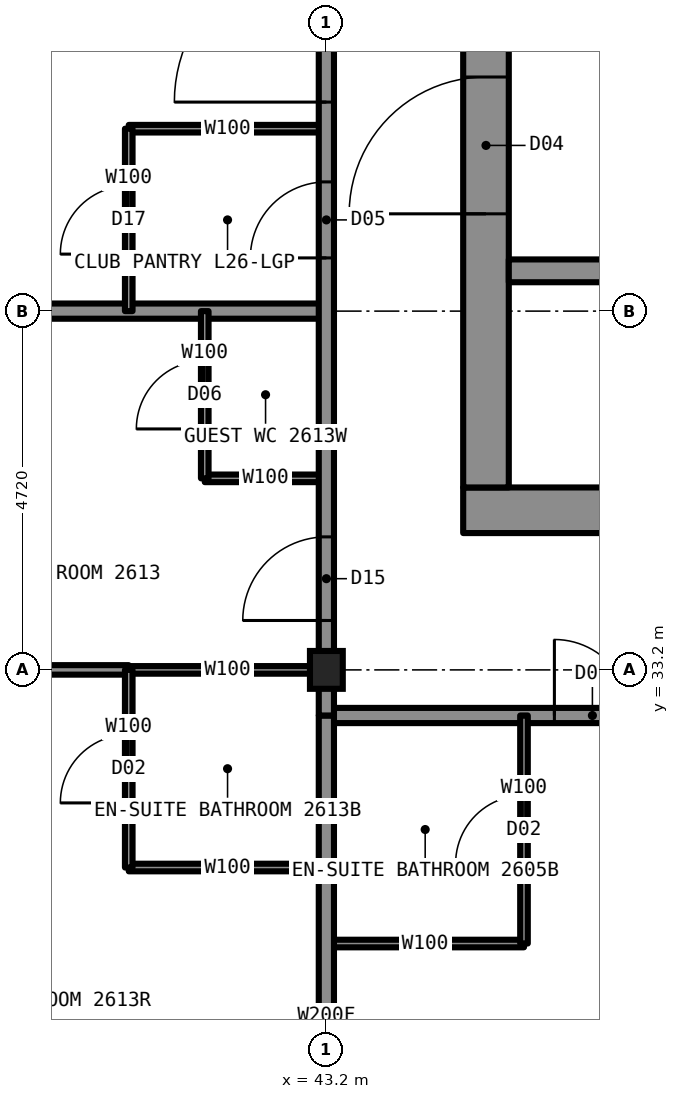
"""IFC4 building model, lengths in metres.
Left out: names, types, materials, properties, quantities, classifications, styles, units other than length and angle.
Written with IfcOpenShell. Run it as: python <this file> out.ifc"""

import sys

from ifc_helpers import new_model, si_unit, direction, frame, frame_2d, origin, origin_2d, place, context, subcontext, project, spatial, rectangle, i_section, extrude, element, fill, save


model = new_model("IFC4")
c1 = context("Model", 3, precision=1e-05, world=origin(), true_north=direction((0.0, 1.0)))
c2 = subcontext(c1, "Body", "Model", "MODEL_VIEW")
j1 = project(units=[si_unit("LENGTHUNIT", "METRE"), si_unit("PLANEANGLEUNIT", "RADIAN")], contexts=[c1])
p1 = place(None, origin())
s1 = spatial("IfcSite", under=j1, at=p1, CompositionType="ELEMENT")
p2 = place(p1, origin())
s2 = spatial("IfcBuilding", under=s1, at=p2, CompositionType="ELEMENT")
p3 = place(p2, frame((0.0, 0.0, 93.4)))
s3 = spatial("IfcBuildingStorey", under=s2, at=p3, CompositionType="ELEMENT", Elevation=93.4)
p4 = place(p3, frame((43.2, 33.2, 0.0), z_axis=(0.0, 0.0, 1.0), x_axis=(1.0, 0.0, 0.0)))
e1 = element("IfcColumn", 1, at=p4, inside=s3, PredefinedType="COLUMN", context=c2, shape_type="SweptSolid", body=[
    extrude(i_section(OverallWidth=0.432, OverallDepth=0.498, WebThickness=0.056, FlangeThickness=0.089, at=origin_2d()), origin(), (0.0, 0.0, 1.0), 3.5),
])
p5 = place(p3, frame((45.0, 35.3, 0.0), z_axis=(0.0, 0.0, 1.0), x_axis=(1.0, 0.0, 0.0)))
e2 = element("IfcWall", 2, at=p5, inside=s3, PredefinedType="SHEAR", context=c2, shape_type="SweptSolid", body=[
    extrude(rectangle(XDim=20.0, YDim=0.6, at=frame_2d((10.0, 0.0))), origin(), (0.0, 0.0, 1.0), 3.5),
])
p6 = place(p3, frame((45.3, 35.6, 0.0), z_axis=(0.0, 0.0, 1.0), x_axis=(0.0, 1.0, 0.0)))
e3 = element("IfcWall", 3, at=p6, inside=s3, PredefinedType="SHEAR", context=c2, shape_type="SweptSolid", body=[
    extrude(rectangle(XDim=18.8, YDim=0.6, at=frame_2d((9.4, 0.0))), origin(), (0.0, 0.0, 1.0), 3.5),
])
p7 = place(p6, frame((13.4, 0.0, 0.0)))
e4 = element("IfcOpeningElement", 4, at=p7, cuts=e3, PredefinedType="OPENING", context=c2, shape_type="SweptSolid", body=[
    extrude(rectangle(XDim=1.8, YDim=2.2, at=frame_2d((0.9, 1.1))), frame((0.0, 0.31, 0.0), z_axis=(0.0, -1.0, 0.0), x_axis=(1.0, 0.0, 0.0)), (0.0, 0.0, 1.0), 0.62),
])
p8 = place(p6, frame((3.6, 0.0, 0.0)))
e5 = element("IfcOpeningElement", 5, at=p8, cuts=e3, PredefinedType="OPENING", context=c2, shape_type="SweptSolid", body=[
    extrude(rectangle(XDim=1.8, YDim=2.2, at=frame_2d((0.9, 1.1))), frame((0.0, 0.31, 0.0), z_axis=(0.0, -1.0, 0.0), x_axis=(1.0, 0.0, 0.0)), (0.0, 0.0, 1.0), 0.62),
])
p9 = place(p6, frame((6.4, 0.0, 0.0)))
e6 = element("IfcOpeningElement", 6, at=p9, cuts=e3, PredefinedType="OPENING", context=c2, shape_type="SweptSolid", body=[
    extrude(rectangle(XDim=1.2, YDim=2.2, at=frame_2d((0.6, 1.1))), frame((0.0, 0.31, 0.0), z_axis=(0.0, -1.0, 0.0), x_axis=(1.0, 0.0, 0.0)), (0.0, 0.0, 1.0), 0.62),
])
p10 = place(p3, frame((45.6, 38.45, 0.0), z_axis=(0.0, 0.0, 1.0), x_axis=(1.0, 0.0, 0.0)))
e7 = element("IfcWall", 7, at=p10, inside=s3, PredefinedType="SHEAR", context=c2, shape_type="SweptSolid", body=[
    extrude(rectangle(XDim=18.8, YDim=0.3, at=frame_2d((9.4, 0.0))), origin(), (0.0, 0.0, 1.0), 3.5),
])
p11 = place(p3, frame((40.6, 33.2, 0.0), z_axis=(0.0, 0.0, 1.0), x_axis=(1.0, 0.0, 0.0)))
e8 = element("IfcWall", 8, at=p11, inside=s3, PredefinedType="PARTITIONING", context=c2, shape_type="SweptSolid", body=[
    extrude(rectangle(XDim=2.6, YDim=0.1, at=frame_2d((1.3, 0.0))), origin(), (0.0, 0.0, 1.0), 2.573),
])
p12 = place(p3, frame((34.7, 33.2, 0.0), z_axis=(0.0, 0.0, 1.0), x_axis=(1.0, 0.0, 0.0)))
e9 = element("IfcWall", 9, at=p12, inside=s3, PredefinedType="PARTITIONING", context=c2, shape_type="SweptSolid", body=[
    extrude(rectangle(XDim=5.9, YDim=0.125, at=frame_2d((2.95, 0.0))), origin(), (0.0, 0.0, 1.0), 2.573),
])
p13 = place(p12, frame((3.85, 0.0, 0.0)))
e10 = element("IfcOpeningElement", 10, at=p13, cuts=e9, PredefinedType="OPENING", context=c2, shape_type="SweptSolid", body=[
    extrude(rectangle(XDim=0.9, YDim=2.2, at=frame_2d((0.45, 1.1))), frame((0.0, 0.073, 0.0), z_axis=(0.0, -1.0, 0.0), x_axis=(1.0, 0.0, 0.0)), (0.0, 0.0, 1.0), 0.145),
])
p14 = place(p3, frame((43.2, 32.6, 0.0), z_axis=(0.0, 0.0, 1.0), x_axis=(1.0, 0.0, 0.0)))
e11 = element("IfcWall", 11, at=p14, inside=s3, PredefinedType="PARTITIONING", context=c2, shape_type="SweptSolid", body=[
    extrude(rectangle(XDim=23.6, YDim=0.2, at=frame_2d((11.8, 0.0))), origin(), (0.0, 0.0, 1.0), 3.33),
])
p15 = place(p14, frame((3.0, 0.0, 0.0)))
e12 = element("IfcOpeningElement", 12, at=p15, cuts=e11, PredefinedType="OPENING", context=c2, shape_type="SweptSolid", body=[
    extrude(rectangle(XDim=1.0, YDim=2.2, at=frame_2d((0.5, 1.1))), frame((0.0, 0.11, 0.0), z_axis=(0.0, -1.0, 0.0), x_axis=(1.0, 0.0, 0.0)), (0.0, 0.0, 1.0), 0.22),
])
p16 = place(p14, frame((9.84, 0.0, 0.0)))
e13 = element("IfcOpeningElement", 13, at=p16, cuts=e11, PredefinedType="OPENING", context=c2, shape_type="SweptSolid", body=[
    extrude(rectangle(XDim=1.0, YDim=2.2, at=frame_2d((0.5, 1.1))), frame((0.0, 0.11, 0.0), z_axis=(0.0, -1.0, 0.0), x_axis=(1.0, 0.0, 0.0)), (0.0, 0.0, 1.0), 0.22),
])
p17 = place(p14, frame((17.16, 0.0, 0.0)))
e14 = element("IfcOpeningElement", 14, at=p17, cuts=e11, PredefinedType="OPENING", context=c2, shape_type="SweptSolid", body=[
    extrude(rectangle(XDim=1.0, YDim=2.2, at=frame_2d((0.5, 1.1))), frame((0.0, 0.11, 0.0), z_axis=(0.0, -1.0, 0.0), x_axis=(1.0, 0.0, 0.0)), (0.0, 0.0, 1.0), 0.22),
])
p18 = place(p3, frame((40.6, 30.6, 0.0), z_axis=(0.0, 0.0, 1.0), x_axis=(1.0, 0.0, 0.0)))
e15 = element("IfcWall", 15, at=p18, inside=s3, PredefinedType="PARTITIONING", context=c2, shape_type="SweptSolid", body=[
    extrude(rectangle(XDim=2.6, YDim=0.1, at=frame_2d((1.3, 0.0))), origin(), (0.0, 0.0, 1.0), 3.33),
])
p19 = place(p3, frame((43.2, 29.6, 0.0), z_axis=(0.0, 0.0, 1.0), x_axis=(1.0, 0.0, 0.0)))
e16 = element("IfcWall", 16, at=p19, inside=s3, PredefinedType="PARTITIONING", context=c2, shape_type="SweptSolid", body=[
    extrude(rectangle(XDim=2.6, YDim=0.1, at=frame_2d((1.3, 0.0))), origin(), (0.0, 0.0, 1.0), 3.33),
])
p20 = place(p3, frame((40.6, 40.32, 0.0), z_axis=(0.0, 0.0, 1.0), x_axis=(1.0, 0.0, 0.0)))
e17 = element("IfcWall", 17, at=p20, inside=s3, PredefinedType="PARTITIONING", context=c2, shape_type="SweptSolid", body=[
    extrude(rectangle(XDim=2.6, YDim=0.1, at=frame_2d((1.3, 0.0))), origin(), (0.0, 0.0, 1.0), 2.731),
])
p21 = place(p3, frame((34.7, 37.92, 0.0), z_axis=(0.0, 0.0, 1.0), x_axis=(1.0, 0.0, 0.0)))
e18 = element("IfcWall", 18, at=p21, inside=s3, PredefinedType="PARTITIONING", context=c2, shape_type="SweptSolid", body=[
    extrude(rectangle(XDim=8.5, YDim=0.2, at=frame_2d((4.25, 0.0))), origin(), (0.0, 0.0, 1.0), 2.573),
])
p22 = place(p3, frame((41.6, 35.72, 0.0), z_axis=(0.0, 0.0, 1.0), x_axis=(1.0, 0.0, 0.0)))
e19 = element("IfcWall", 19, at=p22, inside=s3, PredefinedType="PARTITIONING", context=c2, shape_type="SweptSolid", body=[
    extrude(rectangle(XDim=1.6, YDim=0.1, at=frame_2d((0.8, 0.0))), origin(), (0.0, 0.0, 1.0), 3.33),
])
p23 = place(p3, frame((43.2, 33.22, 0.0), z_axis=(0.0, 0.0, 1.0), x_axis=(0.0, 1.0, 0.0)))
e20 = element("IfcWall", 20, at=p23, inside=s3, PredefinedType="PARTITIONING", context=c2, shape_type="SweptSolid", body=[
    extrude(rectangle(XDim=23.56, YDim=0.2, at=frame_2d((11.78, 0.0))), origin(), (0.0, 0.0, 1.0), 3.33),
])
p24 = place(p23, frame((16.4, 0.0, 0.0)))
e21 = element("IfcOpeningElement", 21, at=p24, cuts=e20, PredefinedType="OPENING", context=c2, shape_type="SweptSolid", body=[
    extrude(rectangle(XDim=1.0, YDim=2.2, at=frame_2d((0.5, 1.1))), frame((0.0, 0.11, 0.0), z_axis=(0.0, -1.0, 0.0), x_axis=(1.0, 0.0, 0.0)), (0.0, 0.0, 1.0), 0.22),
])
p25 = place(p23, frame((21.83, 0.0, 0.0)))
e22 = element("IfcOpeningElement", 22, at=p25, cuts=e20, PredefinedType="OPENING", context=c2, shape_type="SweptSolid", body=[
    extrude(rectangle(XDim=1.1, YDim=2.2, at=frame_2d((0.55, 1.1))), frame((0.0, 0.11, 0.0), z_axis=(0.0, -1.0, 0.0), x_axis=(1.0, 0.0, 0.0)), (0.0, 0.0, 1.0), 0.22),
])
p26 = place(p23, frame((0.63, 0.0, 0.0)))
e23 = element("IfcOpeningElement", 23, at=p26, cuts=e20, PredefinedType="OPENING", context=c2, shape_type="SweptSolid", body=[
    extrude(rectangle(XDim=1.1, YDim=2.2, at=frame_2d((0.55, 1.1))), frame((0.0, 0.11, 0.0), z_axis=(0.0, -1.0, 0.0), x_axis=(1.0, 0.0, 0.0)), (0.0, 0.0, 1.0), 0.22),
])
p27 = place(p23, frame((7.45, 0.0, 0.0)))
e24 = element("IfcOpeningElement", 24, at=p27, cuts=e20, PredefinedType="OPENING", context=c2, shape_type="SweptSolid", body=[
    extrude(rectangle(XDim=2.0, YDim=2.4, at=frame_2d((1.0, 1.2))), frame((0.0, 0.11, 0.0), z_axis=(0.0, -1.0, 0.0), x_axis=(1.0, 0.0, 0.0)), (0.0, 0.0, 1.0), 0.22),
])
p28 = place(p23, frame((5.4, 0.0, 0.0)))
e25 = element("IfcOpeningElement", 25, at=p28, cuts=e20, PredefinedType="OPENING", context=c2, shape_type="SweptSolid", body=[
    extrude(rectangle(XDim=1.0, YDim=2.1, at=frame_2d((0.5, 1.05))), frame((0.0, 0.11, 0.0), z_axis=(0.0, -1.0, 0.0), x_axis=(1.0, 0.0, 0.0)), (0.0, 0.0, 1.0), 0.22),
])
p29 = place(p3, frame((43.2, 24.7, 0.0), z_axis=(0.0, 0.0, 1.0), x_axis=(0.0, 1.0, 0.0)))
e26 = element("IfcWall", 26, at=p29, inside=s3, PredefinedType="PARTITIONING", context=c2, shape_type="SweptSolid", body=[
    extrude(rectangle(XDim=7.9, YDim=0.2, at=frame_2d((3.95, 0.0))), origin(), (0.0, 0.0, 1.0), 2.573),
])
p30 = place(p3, frame((41.6, 35.72, 0.0), z_axis=(0.0, 0.0, 1.0), x_axis=(0.0, 1.0, 0.0)))
e27 = element("IfcWall", 27, at=p30, inside=s3, PredefinedType="PARTITIONING", context=c2, shape_type="SweptSolid", body=[
    extrude(rectangle(XDim=2.2, YDim=0.1, at=frame_2d((1.1, 0.0))), origin(), (0.0, 0.0, 1.0), 3.33),
])
p31 = place(p30, frame((0.65, 0.0, 0.0)))
e28 = element("IfcOpeningElement", 28, at=p31, cuts=e27, PredefinedType="OPENING", context=c2, shape_type="SweptSolid", body=[
    extrude(rectangle(XDim=0.9, YDim=2.1, at=frame_2d((0.45, 1.05))), frame((0.0, 0.06, 0.0), z_axis=(0.0, -1.0, 0.0), x_axis=(1.0, 0.0, 0.0)), (0.0, 0.0, 1.0), 0.12),
])
p32 = place(p3, frame((40.6, 30.6, 0.0), z_axis=(0.0, 0.0, 1.0), x_axis=(0.0, 1.0, 0.0)))
e29 = element("IfcWall", 29, at=p32, inside=s3, PredefinedType="PARTITIONING", context=c2, shape_type="SweptSolid", body=[
    extrude(rectangle(XDim=2.6, YDim=0.1, at=frame_2d((1.3, 0.0))), origin(), (0.0, 0.0, 1.0), 3.33),
])
p33 = place(p32, frame((0.85, 0.0, 0.0)))
e30 = element("IfcOpeningElement", 30, at=p33, cuts=e29, PredefinedType="OPENING", context=c2, shape_type="SweptSolid", body=[
    extrude(rectangle(XDim=0.9, YDim=2.1, at=frame_2d((0.45, 1.05))), frame((0.0, 0.06, 0.0), z_axis=(0.0, -1.0, 0.0), x_axis=(1.0, 0.0, 0.0)), (0.0, 0.0, 1.0), 0.12),
])
p34 = place(p3, frame((40.6, 37.92, 0.0), z_axis=(0.0, 0.0, 1.0), x_axis=(0.0, 1.0, 0.0)))
e31 = element("IfcWall", 31, at=p34, inside=s3, PredefinedType="PARTITIONING", context=c2, shape_type="SweptSolid", body=[
    extrude(rectangle(XDim=2.4, YDim=0.1, at=frame_2d((1.2, 0.0))), origin(), (0.0, 0.0, 1.0), 3.33),
])
p35 = place(p34, frame((0.75, 0.0, 0.0)))
e32 = element("IfcOpeningElement", 32, at=p35, cuts=e31, PredefinedType="OPENING", context=c2, shape_type="SweptSolid", body=[
    extrude(rectangle(XDim=0.9, YDim=2.2, at=frame_2d((0.45, 1.1))), frame((0.0, 0.06, 0.0), z_axis=(0.0, -1.0, 0.0), x_axis=(1.0, 0.0, 0.0)), (0.0, 0.0, 1.0), 0.12),
])
p36 = place(p3, frame((45.8, 29.6, 0.0), z_axis=(0.0, 0.0, 1.0), x_axis=(0.0, 1.0, 0.0)))
e33 = element("IfcWall", 33, at=p36, inside=s3, PredefinedType="PARTITIONING", context=c2, shape_type="SweptSolid", body=[
    extrude(rectangle(XDim=3.0, YDim=0.1, at=frame_2d((1.5, 0.0))), origin(), (0.0, 0.0, 1.0), 3.33),
])
p37 = place(p36, frame((1.05, 0.0, 0.0)))
e34 = element("IfcOpeningElement", 34, at=p37, cuts=e33, PredefinedType="OPENING", context=c2, shape_type="SweptSolid", body=[
    extrude(rectangle(XDim=0.9, YDim=2.1, at=frame_2d((0.45, 1.05))), frame((0.0, 0.06, 0.0), z_axis=(0.0, -1.0, 0.0), x_axis=(1.0, 0.0, 0.0)), (0.0, 0.0, 1.0), 0.12),
])
p38 = place(p3, frame((43.2, 32.6, 0.0), z_axis=(0.0, 0.0, 1.0), x_axis=(0.0, 1.0, 0.0)))
e35 = element("IfcWall", 35, at=p38, inside=s3, PredefinedType="PARTITIONING", context=c2, shape_type="SweptSolid", body=[
    extrude(rectangle(XDim=0.62, YDim=0.2, at=frame_2d((0.31, 0.0))), origin(), (0.0, 0.0, 1.0), 2.573),
])
p39 = place(p15, origin())
e36 = element("IfcDoor", 36, at=p39, inside=s3, OperationType="SINGLE_SWING_LEFT", PredefinedType="DOOR", context=c2, shape_type="SweptSolid", body=[
    extrude(rectangle(XDim=1.0, YDim=2.2, at=frame_2d((0.5, 1.1))), frame((0.0, 0.025, 0.0), z_axis=(0.0, -1.0, 0.0), x_axis=(1.0, 0.0, 0.0)), (0.0, 0.0, 1.0), 0.05),
])
fill(e12, e36)
p40 = place(p37, origin())
e37 = element("IfcDoor", 37, at=p40, inside=s3, OperationType="SINGLE_SWING_RIGHT", PredefinedType="DOOR", context=c2, shape_type="SweptSolid", body=[
    extrude(rectangle(XDim=0.9, YDim=2.1, at=frame_2d((0.45, 1.05))), frame((0.0, 0.025, 0.0), z_axis=(0.0, -1.0, 0.0), x_axis=(1.0, 0.0, 0.0)), (0.0, 0.0, 1.0), 0.05),
])
fill(e34, e37)
p41 = place(p26, origin())
e38 = element("IfcDoor", 38, at=p41, inside=s3, OperationType="SINGLE_SWING_LEFT", PredefinedType="DOOR", context=c2, shape_type="SweptSolid", body=[
    extrude(rectangle(XDim=1.1, YDim=2.2, at=frame_2d((0.55, 1.1))), frame((0.0, 0.025, 0.0), z_axis=(0.0, -1.0, 0.0), x_axis=(1.0, 0.0, 0.0)), (0.0, 0.0, 1.0), 0.05),
])
fill(e23, e38)
p42 = place(p33, origin())
e39 = element("IfcDoor", 39, at=p42, inside=s3, OperationType="SINGLE_SWING_RIGHT", PredefinedType="DOOR", context=c2, shape_type="SweptSolid", body=[
    extrude(rectangle(XDim=0.9, YDim=2.1, at=frame_2d((0.45, 1.05))), frame((0.0, 0.025, 0.0), z_axis=(0.0, -1.0, 0.0), x_axis=(1.0, 0.0, 0.0)), (0.0, 0.0, 1.0), 0.05),
])
fill(e30, e39)
p43 = place(p31, origin())
e40 = element("IfcDoor", 40, at=p43, inside=s3, OperationType="SINGLE_SWING_LEFT", PredefinedType="DOOR", context=c2, shape_type="SweptSolid", body=[
    extrude(rectangle(XDim=0.9, YDim=2.1, at=frame_2d((0.45, 1.05))), frame((0.0, 0.025, 0.0), z_axis=(0.0, -1.0, 0.0), x_axis=(1.0, 0.0, 0.0)), (0.0, 0.0, 1.0), 0.05),
])
fill(e28, e40)
p44 = place(p27, origin())
e41 = element("IfcDoor", 41, at=p44, inside=s3, OperationType="DOUBLE_DOOR_SINGLE_SWING", PredefinedType="DOOR", context=c2, shape_type="SweptSolid", body=[
    extrude(rectangle(XDim=2.0, YDim=2.4, at=frame_2d((1.0, 1.2))), frame((0.0, 0.025, 0.0), z_axis=(0.0, -1.0, 0.0), x_axis=(1.0, 0.0, 0.0)), (0.0, 0.0, 1.0), 0.05),
])
fill(e24, e41)
p45 = place(p35, origin())
e42 = element("IfcDoor", 42, at=p45, inside=s3, OperationType="SINGLE_SWING_LEFT", PredefinedType="DOOR", context=c2, shape_type="SweptSolid", body=[
    extrude(rectangle(XDim=0.9, YDim=2.2, at=frame_2d((0.45, 1.1))), frame((0.0, 0.025, 0.0), z_axis=(0.0, -1.0, 0.0), x_axis=(1.0, 0.0, 0.0)), (0.0, 0.0, 1.0), 0.05),
])
fill(e32, e42)
p46 = place(p28, origin())
e43 = element("IfcDoor", 43, at=p46, inside=s3, OperationType="SINGLE_SWING_LEFT", PredefinedType="DOOR", context=c2, shape_type="SweptSolid", body=[
    extrude(rectangle(XDim=1.0, YDim=2.1, at=frame_2d((0.5, 1.05))), frame((0.0, 0.025, 0.0), z_axis=(0.0, -1.0, 0.0), x_axis=(1.0, 0.0, 0.0)), (0.0, 0.0, 1.0), 0.05),
])
fill(e25, e43)
p47 = place(p8, origin())
e44 = element("IfcDoor", 44, at=p47, inside=s3, OperationType="DOUBLE_DOOR_SINGLE_SWING", PredefinedType="DOOR", context=c2, shape_type="SweptSolid", body=[
    extrude(rectangle(XDim=1.8, YDim=2.2, at=frame_2d((0.9, 1.1))), frame((0.0, 0.025, 0.0), z_axis=(0.0, -1.0, 0.0), x_axis=(1.0, 0.0, 0.0)), (0.0, 0.0, 1.0), 0.05),
])
fill(e5, e44)
save(model, sys.argv[1])
